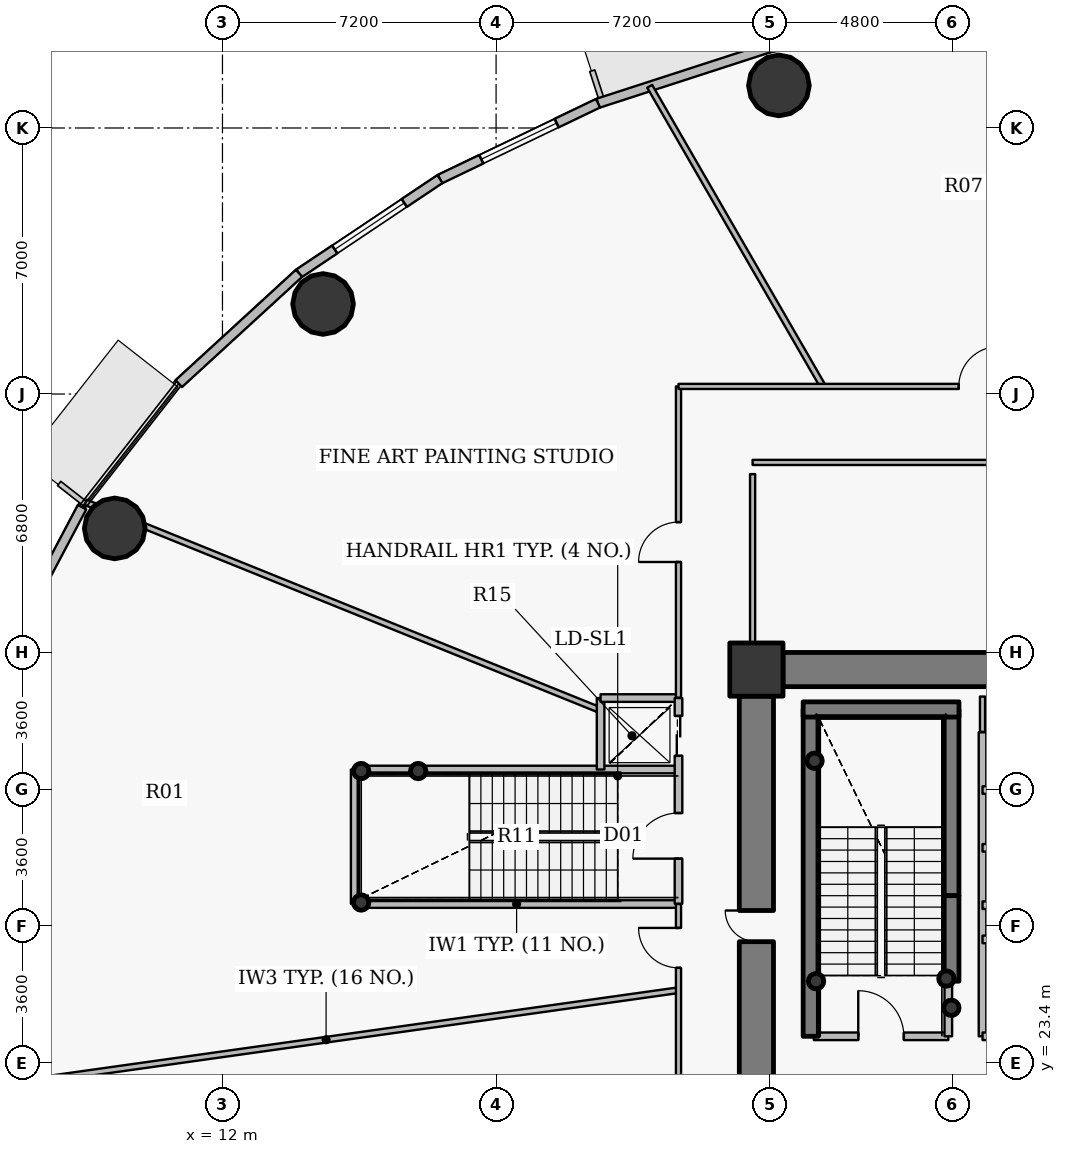
"""IFC4 building model, lengths in metres.
Left out: names, types, materials, properties, quantities, classifications, styles, units other than length and angle.
Written with IfcOpenShell. Run it as: python <this file> out.ifc"""

import sys

from ifc_helpers import new_model, si_unit, direction, frame, frame_2d, origin, origin_2d, place, context, subcontext, project, spatial, rectangle, hollow_circle, extrude, source, transform, mapped, element, fill, save


model = new_model("IFC4")
c1 = context("Model", 3, precision=1e-05, world=origin(), true_north=direction((0.0, 1.0)))
c2 = subcontext(c1, "Body", "Model", "MODEL_VIEW")
j1 = project(units=[si_unit("LENGTHUNIT", "METRE"), si_unit("PLANEANGLEUNIT", "RADIAN")], contexts=[c1])
p1 = place(None, origin())
s1 = spatial("IfcSite", under=j1, at=p1, CompositionType="ELEMENT")
p2 = place(p1, origin())
s2 = spatial("IfcBuilding", under=s1, at=p2, CompositionType="ELEMENT")
p3 = place(p2, frame((0.0, 0.0, 40.8)))
s3 = spatial("IfcBuildingStorey", under=s2, at=p3, CompositionType="ELEMENT", Elevation=40.8)
p4 = place(p3, frame((26.05, 33.75, 0.0), z_axis=(0.0, 0.0, 1.0), x_axis=(1.0, 0.0, 0.0)))
e1 = element("IfcColumn", 1, at=p4, inside=s3, PredefinedType="COLUMN", context=c2, shape_type="SweptSolid", body=[
    extrude(rectangle(XDim=1.4, YDim=1.4, at=origin_2d()), origin(), (0.0, 0.0, 1.0), 4.2),
])
p5 = place(p3, frame((27.48, 24.1, 0.0), z_axis=(0.0, 0.0, 1.0), x_axis=(0.0, 1.0, 0.0)))
e2 = element("IfcWall", 2, at=p5, inside=s3, PredefinedType="SHEAR", context=c2, shape_type="SweptSolid", body=[
    extrude(rectangle(XDim=8.6, YDim=0.4, at=frame_2d((4.3, 0.0))), origin(), (0.0, 0.0, 1.0), 4.2),
])
p6 = place(p3, frame((31.18, 27.8, 0.0), z_axis=(0.0, 0.0, 1.0), x_axis=(0.0, 1.0, 0.0)))
e3 = element("IfcWall", 3, at=p6, inside=s3, PredefinedType="SHEAR", context=c2, shape_type="SweptSolid", body=[
    extrude(rectangle(XDim=4.9, YDim=0.4, at=frame_2d((2.45, 0.0))), origin(), (0.0, 0.0, 1.0), 4.2),
])
p7 = place(p3, frame((27.28, 32.7, 0.0), z_axis=(0.0, 0.0, 1.0), x_axis=(1.0, 0.0, 0.0)))
e4 = element("IfcWall", 4, at=p7, inside=s3, PredefinedType="SHEAR", context=c2, shape_type="SweptSolid", body=[
    extrude(rectangle(XDim=4.1, YDim=0.4, at=frame_2d((2.05, 0.0))), origin(), (0.0, 0.0, 1.0), 4.2),
])
for number, where, z_axis, x_axis in (
    (5, (27.58, 31.35, 0.0), (0.0, 0.0, 1.0), (1.0, 0.0, 0.0)),
    (6, (31.05, 25.62, 0.0), (0.0, 0.0, 1.0), (1.0, 0.0, 0.0)),
    (7, (31.18, 24.85, 0.0), (0.0, 0.0, 1.0), (1.0, 0.0, 0.0)),
    (8, (27.62, 25.55, 0.0), (0.0, 0.0, 1.0), (1.0, 0.0, 0.0)),
    (9, (15.65, 27.62, 0.0), (0.0, 0.0, 1.0), (1.0, 0.0, 0.0)),
    (10, (15.65, 31.08, 0.0), (0.0, 0.0, 1.0), (1.0, 0.0, 0.0)),
    (11, (17.15, 31.08, 0.0), (0.0, 0.0, 1.0), (1.0, 0.0, 0.0)),
):
    element("IfcColumn", number, at=place(p3, frame(where, z_axis=z_axis, x_axis=x_axis)), inside=s3, PredefinedType="COLUMN", context=c2, shape_type="SweptSolid", body=[
        extrude(hollow_circle(Radius=0.203, WallThickness=0.016, at=origin_2d()), origin(), (0.0, 0.0, 1.0), 4.2),
    ])
p8 = place(p3, frame((26.75, 33.75, 0.0), z_axis=(0.0, 0.0, 1.0), x_axis=(1.0, 0.0, 0.0)))
e12 = element("IfcWall", 12, at=p8, inside=s3, PredefinedType="SHEAR", context=c2, shape_type="SweptSolid", body=[
    extrude(rectangle(XDim=18.5, YDim=0.9, at=frame_2d((9.25, 0.0))), origin(), (0.0, 0.0, 1.0), 3.4),
])
p9 = place(p3, frame((26.05, 20.95, 0.0), z_axis=(0.0, 0.0, 1.0), x_axis=(0.0, 1.0, 0.0)))
e13 = element("IfcWall", 13, at=p9, inside=s3, PredefinedType="SHEAR", context=c2, shape_type="SweptSolid", body=[
    extrude(rectangle(XDim=12.1, YDim=0.9, at=frame_2d((6.05, 0.0))), origin(), (0.0, 0.0, 1.0), 3.4),
])
p10 = place(p9, frame((5.64, 0.0, 0.0)))
e14 = element("IfcOpeningElement", 14, at=p10, cuts=e13, PredefinedType="OPENING", context=c2, shape_type="SweptSolid", body=[
    extrude(rectangle(XDim=0.82, YDim=2.1, at=origin_2d()), frame((0.41, 0.46, 1.05), z_axis=(0.0, -1.0, 0.0), x_axis=(1.0, 0.0, 0.0)), (0.0, 0.0, 1.0), 0.92),
])
p11 = place(p3, frame((31.18, 25.55, 0.0), z_axis=(0.0, 0.0, 1.0), x_axis=(0.0, 1.0, 0.0)))
e15 = element("IfcWall", 15, at=p11, inside=s3, PredefinedType="SHEAR", context=c2, shape_type="SweptSolid", body=[
    extrude(rectangle(XDim=2.25, YDim=0.4, at=frame_2d((1.125, 0.0))), origin(), (0.0, 0.0, 1.0), 3.55),
])
for number, where, z_axis, x_axis in (
    (16, (26.642, 49.12, 0.0), (0.0, 0.0, 1.0), (1.0, 0.0, 0.0)),
    (17, (14.647, 43.369, 0.0), (0.0, 0.0, 1.0), (1.0, 0.0, 0.0)),
    (18, (9.165, 37.464, 0.0), (0.0, 0.0, 1.0), (1.0, 0.0, 0.0)),
):
    element("IfcColumn", number, at=place(p3, frame(where, z_axis=z_axis, x_axis=x_axis)), inside=s3, PredefinedType="COLUMN", context=c2, shape_type="SweptSolid", body=[
        extrude(hollow_circle(Radius=0.8, WallThickness=0.045, at=origin_2d()), origin(), (0.0, 0.0, 1.0), 4.2),
    ])
p12 = place(p3, frame((21.882, 48.651, 0.0), z_axis=(0.0, 0.0, 1.0), x_axis=(0.951207699013, 0.308551313946, 0.0)))
e19 = element("IfcWall", 19, at=p12, inside=s3, PredefinedType="SOLIDWALL", context=c2, shape_type="SweptSolid", body=[
    extrude(rectangle(XDim=4.739, YDim=0.25, at=frame_2d((2.369, 0.0))), origin(), (0.0, 0.0, 1.0), 3.95),
])
p13 = place(p3, frame((17.723, 46.656, 0.0), z_axis=(0.0, 0.0, 1.0), x_axis=(0.901601503137, 0.432567601123, 0.0)))
e20 = element("IfcWall", 20, at=p13, inside=s3, PredefinedType="SOLIDWALL", context=c2, shape_type="SweptSolid", body=[
    extrude(rectangle(XDim=4.613, YDim=0.25, at=frame_2d((2.306, 0.0))), origin(), (0.0, 0.0, 1.0), 3.95),
])
p14 = place(p13, frame((1.207, 0.0, 0.9)))
e21 = element("IfcOpeningElement", 21, at=p14, cuts=e20, PredefinedType="OPENING", context=c2, shape_type="SweptSolid", body=[
    extrude(rectangle(XDim=2.2, YDim=2.0, at=origin_2d()), frame((1.1, 0.135, 1.0), z_axis=(0.0, -1.0, 0.0), x_axis=(1.0, 0.0, 0.0)), (0.0, 0.0, 1.0), 0.27),
])
p15 = place(p3, frame((14.015, 44.176, 0.0), z_axis=(0.0, 0.0, 1.0), x_axis=(0.831240982525, 0.555912249343, 0.0)))
e22 = element("IfcWall", 22, at=p15, inside=s3, PredefinedType="SOLIDWALL", context=c2, shape_type="SweptSolid", body=[
    extrude(rectangle(XDim=4.46, YDim=0.25, at=frame_2d((2.23, 0.0))), origin(), (0.0, 0.0, 1.0), 3.95),
])
p16 = place(p15, frame((1.13, 0.0, 0.9)))
e23 = element("IfcOpeningElement", 23, at=p16, cuts=e22, PredefinedType="OPENING", context=c2, shape_type="SweptSolid", body=[
    extrude(rectangle(XDim=2.2, YDim=2.0, at=origin_2d()), frame((1.1, 0.135, 1.0), z_axis=(0.0, -1.0, 0.0), x_axis=(1.0, 0.0, 0.0)), (0.0, 0.0, 1.0), 0.27),
])
p17 = place(p3, frame((10.85, 41.275, 0.0), z_axis=(0.0, 0.0, 1.0), x_axis=(0.737116376281, 0.67576582321, 0.0)))
e24 = element("IfcWall", 24, at=p17, inside=s3, PredefinedType="SOLIDWALL", context=c2, shape_type="SweptSolid", body=[
    extrude(rectangle(XDim=4.294, YDim=0.25, at=frame_2d((2.147, 0.0))), origin(), (0.0, 0.0, 1.0), 3.95),
])
p18 = place(p3, frame((6.442, 34.501, 0.0), z_axis=(0.0, 0.0, 1.0), x_axis=(0.467662443071, 0.883907144072, 0.0)))
e25 = element("IfcWall", 25, at=p18, inside=s3, PredefinedType="SOLIDWALL", context=c2, shape_type="SweptSolid", body=[
    extrude(rectangle(XDim=3.984, YDim=0.25, at=frame_2d((1.992, 0.0))), origin(), (0.0, 0.0, 1.0), 3.95),
])
p19 = place(p3, frame((5.454, 22.707, 0.0), z_axis=(0.0, 0.0, 1.0), x_axis=(0.990268652703, 0.139168945795, 0.0)))
e26 = element("IfcWall", 26, at=p19, inside=s3, PredefinedType="PARTITIONING", context=c2, shape_type="SweptSolid", body=[
    extrude(rectangle(XDim=18.729, YDim=0.15, at=frame_2d((9.364, 0.0))), origin(), (0.0, 0.0, 1.0), 3.335),
])
p20 = place(p3, frame((8.4, 38.151, 0.0), z_axis=(0.0, 0.0, 1.0), x_axis=(0.927179581649, -0.374617169084, 0.0)))
e27 = element("IfcWall", 27, at=p20, inside=s3, PredefinedType="PARTITIONING", context=c2, shape_type="SweptSolid", body=[
    extrude(rectangle(XDim=14.615, YDim=0.15, at=frame_2d((7.307, 0.0))), origin(), (0.0, 0.0, 1.0), 3.285),
])
p21 = place(p3, frame((15.48, 27.58, 0.0), z_axis=(0.0, 0.0, 1.0), x_axis=(0.0, 1.0, 0.0)))
e28 = element("IfcWall", 28, at=p21, inside=s3, PredefinedType="PARTITIONING", context=c2, shape_type="SweptSolid", body=[
    extrude(rectangle(XDim=3.54, YDim=0.2, at=frame_2d((1.77, 0.0))), origin(), (0.0, 0.0, 1.0), 3.95),
])
for number, where, z_axis, x_axis in (
    (29, (15.48, 27.58, 0.0), (0.0, 0.0, 1.0), (1.0, 0.0, 0.0)),
    (30, (15.48, 31.12, 0.0), (0.0, 0.0, 1.0), (1.0, 0.0, 0.0)),
):
    element("IfcWall", number, at=place(p3, frame(where, z_axis=z_axis, x_axis=x_axis)), inside=s3, PredefinedType="PARTITIONING", context=c2, shape_type="SweptSolid", body=[
        extrude(rectangle(XDim=8.52, YDim=0.2, at=frame_2d((4.26, 0.0))), origin(), (0.0, 0.0, 1.0), 3.95),
    ])
p22 = place(p3, frame((21.95, 31.12, 0.0), z_axis=(0.0, 0.0, 1.0), x_axis=(0.0, 1.0, 0.0)))
e31 = element("IfcWall", 31, at=p22, inside=s3, PredefinedType="PARTITIONING", context=c2, shape_type="SweptSolid", body=[
    extrude(rectangle(XDim=1.88, YDim=0.2, at=frame_2d((0.94, 0.0))), origin(), (0.0, 0.0, 1.0), 3.285),
])
p23 = place(p3, frame((21.95, 33.0, 0.0), z_axis=(0.0, 0.0, 1.0), x_axis=(1.0, 0.0, 0.0)))
e32 = element("IfcWall", 32, at=p23, inside=s3, PredefinedType="PARTITIONING", context=c2, shape_type="SweptSolid", body=[
    extrude(rectangle(XDim=2.05, YDim=0.2, at=frame_2d((1.025, 0.0))), origin(), (0.0, 0.0, 1.0), 3.95),
])
p24 = place(p3, frame((23.242, 49.098, 0.0), z_axis=(0.0, 0.0, 1.0), x_axis=(0.499985867395, -0.866033563094, 0.0)))
e33 = element("IfcWall", 33, at=p24, inside=s3, PredefinedType="PARTITIONING", context=c2, shape_type="SweptSolid", body=[
    extrude(rectangle(XDim=9.119, YDim=0.15, at=frame_2d((4.56, 0.0))), origin(), (0.0, 0.0, 1.0), 3.335),
])
p25 = place(p3, frame((24.0, 14.8, 0.0), z_axis=(0.0, 0.0, 1.0), x_axis=(0.0, 1.0, 0.0)))
e34 = element("IfcWall", 34, at=p25, inside=s3, PredefinedType="PARTITIONING", context=c2, shape_type="SweptSolid", body=[
    extrude(rectangle(XDim=12.78, YDim=0.135, at=frame_2d((6.39, 0.0))), origin(), (0.0, 0.0, 1.0), 3.285),
])
p26 = place(p25, frame((11.102, 0.0, 0.0)))
e35 = element("IfcOpeningElement", 35, at=p26, cuts=e34, PredefinedType="OPENING", context=c2, shape_type="SweptSolid", body=[
    extrude(rectangle(XDim=1.05, YDim=2.15, at=origin_2d()), frame((0.525, 0.078, 1.075), z_axis=(0.0, -1.0, 0.0), x_axis=(1.0, 0.0, 0.0)), (0.0, 0.0, 1.0), 0.155),
])
p27 = place(p25, frame((6.144, 0.0, 0.0)))
e36 = element("IfcOpeningElement", 36, at=p27, cuts=e34, PredefinedType="OPENING", context=c2, shape_type="SweptSolid", body=[
    extrude(rectangle(XDim=1.05, YDim=2.15, at=origin_2d()), frame((0.525, 0.078, 1.075), z_axis=(0.0, -1.0, 0.0), x_axis=(1.0, 0.0, 0.0)), (0.0, 0.0, 1.0), 0.155),
])
p28 = place(p3, frame((24.0, 27.59, 0.0), z_axis=(0.0, 0.0, 1.0), x_axis=(0.0, 1.0, 0.0)))
e37 = element("IfcWall", 37, at=p28, inside=s3, PredefinedType="PARTITIONING", context=c2, shape_type="SweptSolid", body=[
    extrude(rectangle(XDim=5.41, YDim=0.2, at=frame_2d((2.705, 0.0))), origin(), (0.0, 0.0, 1.0), 3.285),
])
p29 = place(p28, frame((1.185, 0.0, 0.0)))
e38 = element("IfcOpeningElement", 38, at=p29, cuts=e37, PredefinedType="OPENING", context=c2, shape_type="SweptSolid", body=[
    extrude(rectangle(XDim=1.2, YDim=2.15, at=origin_2d()), frame((0.6, 0.11, 1.075), z_axis=(0.0, -1.0, 0.0), x_axis=(1.0, 0.0, 0.0)), (0.0, 0.0, 1.0), 0.22),
])
p30 = place(p28, frame((3.89, 0.0, 0.0)))
e39 = element("IfcOpeningElement", 39, at=p30, cuts=e37, PredefinedType="OPENING", context=c2, shape_type="SweptSolid", body=[
    extrude(rectangle(XDim=1.05, YDim=2.15, at=origin_2d()), frame((0.525, 0.11, 1.075), z_axis=(0.0, -1.0, 0.0), x_axis=(1.0, 0.0, 0.0)), (0.0, 0.0, 1.0), 0.22),
])
p31 = place(p3, frame((24.0, 33.01, 0.0), z_axis=(0.0, 0.0, 1.0), x_axis=(0.0, 1.0, 0.0)))
e40 = element("IfcWall", 40, at=p31, inside=s3, PredefinedType="PARTITIONING", context=c2, shape_type="SweptSolid", body=[
    extrude(rectangle(XDim=8.19, YDim=0.135, at=frame_2d((4.095, 0.0))), origin(), (0.0, 0.0, 1.0), 3.285),
])
p32 = place(p31, frame((3.57, 0.0, 0.0)))
e41 = element("IfcOpeningElement", 41, at=p32, cuts=e40, PredefinedType="OPENING", context=c2, shape_type="SweptSolid", body=[
    extrude(rectangle(XDim=1.05, YDim=2.15, at=origin_2d()), frame((0.525, 0.078, 1.075), z_axis=(0.0, -1.0, 0.0), x_axis=(1.0, 0.0, 0.0)), (0.0, 0.0, 1.0), 0.155),
])
p33 = place(p3, frame((24.0, 41.2, 0.0), z_axis=(0.0, 0.0, 1.0), x_axis=(1.0, 0.0, 0.0)))
e42 = element("IfcWall", 42, at=p33, inside=s3, PredefinedType="PARTITIONING", context=c2, shape_type="SweptSolid", body=[
    extrude(rectangle(XDim=24.0, YDim=0.135, at=frame_2d((12.0, 0.0))), origin(), (0.0, 0.0, 1.0), 3.285),
])
p34 = place(p33, frame((15.574, 0.0, 0.0)))
e43 = element("IfcOpeningElement", 43, at=p34, cuts=e42, PredefinedType="OPENING", context=c2, shape_type="SweptSolid", body=[
    extrude(rectangle(XDim=1.05, YDim=2.15, at=origin_2d()), frame((0.525, 0.078, 1.075), z_axis=(0.0, -1.0, 0.0), x_axis=(1.0, 0.0, 0.0)), (0.0, 0.0, 1.0), 0.155),
])
p35 = place(p33, frame((7.376, 0.0, 0.0)))
e44 = element("IfcOpeningElement", 44, at=p35, cuts=e42, PredefinedType="OPENING", context=c2, shape_type="SweptSolid", body=[
    extrude(rectangle(XDim=1.05, YDim=2.15, at=origin_2d()), frame((0.525, 0.078, 1.075), z_axis=(0.0, -1.0, 0.0), x_axis=(1.0, 0.0, 0.0)), (0.0, 0.0, 1.0), 0.155),
])
p36 = place(p3, frame((27.56, 24.1, 0.0), z_axis=(0.0, 0.0, 1.0), x_axis=(1.0, 0.0, 0.0)))
e45 = element("IfcWall", 45, at=p36, inside=s3, PredefinedType="PARTITIONING", context=c2, shape_type="SweptSolid", body=[
    extrude(rectangle(XDim=3.54, YDim=0.2, at=frame_2d((1.77, 0.0))), origin(), (0.0, 0.0, 1.0), 3.95),
])
p37 = place(p36, frame((1.17, 0.0, 0.0)))
e46 = element("IfcOpeningElement", 46, at=p37, cuts=e45, PredefinedType="OPENING", context=c2, shape_type="SweptSolid", body=[
    extrude(rectangle(XDim=1.2, YDim=2.15, at=origin_2d()), frame((0.6, 0.11, 1.075), z_axis=(0.0, -1.0, 0.0), x_axis=(1.0, 0.0, 0.0)), (0.0, 0.0, 1.0), 0.22),
])
p38 = place(p3, frame((31.1, 24.1, 0.0), z_axis=(0.0, 0.0, 1.0), x_axis=(0.0, 1.0, 0.0)))
e47 = element("IfcWall", 47, at=p38, inside=s3, PredefinedType="PARTITIONING", context=c2, shape_type="SweptSolid", body=[
    extrude(rectangle(XDim=1.44, YDim=0.2, at=frame_2d((0.72, 0.0))), origin(), (0.0, 0.0, 1.0), 3.95),
])
p39 = place(p3, frame((32.0, 24.1, 0.0), z_axis=(0.0, 0.0, 1.0), x_axis=(0.0, 1.0, 0.0)))
e48 = element("IfcWall", 48, at=p39, inside=s3, PredefinedType="PARTITIONING", context=c2, shape_type="SweptSolid", body=[
    extrude(rectangle(XDim=8.0, YDim=0.2, at=frame_2d((4.0, 0.0))), origin(), (0.0, 0.0, 1.0), 3.95),
])
p40 = place(p3, frame((32.0, 24.1, 0.0), z_axis=(0.0, 0.0, 1.0), x_axis=(1.0, 0.0, 0.0)))
e49 = element("IfcWall", 49, at=p40, inside=s3, PredefinedType="PARTITIONING", context=c2, shape_type="SweptSolid", body=[
    extrude(rectangle(XDim=1.9, YDim=0.2, at=frame_2d((0.95, 0.0))), origin(), (0.0, 0.0, 1.0), 3.535),
])
p41 = place(p40, frame((0.375, 0.0, 0.0)))
e50 = element("IfcOpeningElement", 50, at=p41, cuts=e49, PredefinedType="OPENING", context=c2, shape_type="SweptSolid", body=[
    extrude(rectangle(XDim=1.15, YDim=2.15, at=origin_2d()), frame((0.575, 0.11, 1.075), z_axis=(0.0, -1.0, 0.0), x_axis=(1.0, 0.0, 0.0)), (0.0, 0.0, 1.0), 0.22),
])
for number, where, z_axis, x_axis in (
    (51, (32.0, 26.65, 0.0), (0.0, 0.0, 1.0), (1.0, 0.0, 0.0)),
    (52, (32.0, 27.55, 0.0), (0.0, 0.0, 1.0), (1.0, 0.0, 0.0)),
    (53, (32.0, 29.06, 0.0), (0.0, 0.0, 1.0), (1.0, 0.0, 0.0)),
    (54, (32.0, 30.58, 0.0), (0.0, 0.0, 1.0), (1.0, 0.0, 0.0)),
):
    element("IfcWall", number, at=place(p3, frame(where, z_axis=z_axis, x_axis=x_axis)), inside=s3, PredefinedType="PARTITIONING", context=c2, shape_type="SweptSolid", body=[
        extrude(rectangle(XDim=1.9, YDim=0.2, at=frame_2d((0.95, 0.0))), origin(), (0.0, 0.0, 1.0), 3.535),
    ])
p42 = place(p3, frame((32.0, 33.04, 0.0), z_axis=(0.0, 0.0, 1.0), x_axis=(0.0, -1.0, 0.0)))
e55 = element("IfcWall", 55, at=p42, inside=s3, PredefinedType="PARTITIONING", context=c2, shape_type="SweptSolid", body=[
    extrude(rectangle(XDim=0.93, YDim=0.135, at=frame_2d((0.465, 0.0))), origin(), (0.0, 0.0, 1.0), 3.485),
])
p43 = place(p3, frame((38.893, 39.2, 0.0), z_axis=(0.0, 0.0, 1.0), x_axis=(-1.0, 0.0, 0.0)))
e56 = element("IfcWall", 56, at=p43, inside=s3, PredefinedType="PARTITIONING", context=c2, shape_type="SweptSolid", body=[
    extrude(rectangle(XDim=12.943, YDim=0.135, at=frame_2d((6.471, 0.0))), origin(), (0.0, 0.0, 1.0), 3.285),
])
p44 = place(p3, frame((25.95, 38.893, 0.0), z_axis=(0.0, 0.0, 1.0), x_axis=(0.0, -1.0, 0.0)))
e57 = element("IfcWall", 57, at=p44, inside=s3, PredefinedType="PARTITIONING", context=c2, shape_type="SweptSolid", body=[
    extrude(rectangle(XDim=4.693, YDim=0.135, at=frame_2d((2.346, 0.0))), origin(), (0.0, 0.0, 1.0), 3.285),
])
p45 = place(p3, frame((25.6, 34.2, 0.0), z_axis=(0.0, 0.0, 1.0), x_axis=(0.0, -1.0, 0.0)))
e58 = element("IfcWall", 58, at=p45, inside=s3, PredefinedType="PARTITIONING", context=c2, shape_type="SweptSolid", body=[
    extrude(rectangle(XDim=1.14, YDim=0.135, at=frame_2d((0.57, 0.0))), origin(), (0.0, 0.0, 1.0), 3.95),
])
m1 = source(origin(), c2, "Body", "SweptSolid", [
    extrude(rectangle(XDim=2.2, YDim=2.0, at=origin_2d()), frame((1.1, 0.03, 1.0), z_axis=(0.0, -1.0, 0.0), x_axis=(1.0, 0.0, 0.0)), (0.0, 0.0, 1.0), 0.06),
])
p46 = place(p14, origin())
e59 = element("IfcWindow", 59, at=p46, inside=s3, PartitioningType="TRIPLE_PANEL_VERTICAL", PredefinedType="WINDOW", context=c2, shape_type="MappedRepresentation", body=[
    mapped(m1, transform((0.0, 0.0, 0.0), x_axis=(1.0, 0.0, 0.0), y_axis=(0.0, 1.0, 0.0), z_axis=(0.0, 0.0, 1.0), scale=1.0)),
])
fill(e21, e59)
p47 = place(p16, origin())
e60 = element("IfcWindow", 60, at=p47, inside=s3, PartitioningType="TRIPLE_PANEL_VERTICAL", PredefinedType="WINDOW", context=c2, shape_type="MappedRepresentation", body=[
    mapped(m1, transform((0.0, 0.0, 0.0), x_axis=(1.0, 0.0, 0.0), y_axis=(0.0, 1.0, 0.0), z_axis=(0.0, 0.0, 1.0), scale=1.0)),
])
fill(e23, e60)
m2 = source(origin(), c2, "Body", "SweptSolid", [
    extrude(rectangle(XDim=0.82, YDim=2.1, at=origin_2d()), frame((0.41, 0.025, 1.05), z_axis=(0.0, -1.0, 0.0), x_axis=(1.0, 0.0, 0.0)), (0.0, 0.0, 1.0), 0.05),
])
p48 = place(p10, origin())
e61 = element("IfcDoor", 61, at=p48, inside=s3, OperationType="SINGLE_SWING_RIGHT", PredefinedType="DOOR", context=c2, shape_type="MappedRepresentation", body=[
    mapped(m2, transform((0.0, 0.0, 0.0), x_axis=(1.0, 0.0, 0.0), y_axis=(0.0, 1.0, 0.0), z_axis=(0.0, 0.0, 1.0), scale=1.0)),
])
fill(e14, e61)
m3 = source(origin(), c2, "Body", "SweptSolid", [
    extrude(rectangle(XDim=1.2, YDim=2.15, at=origin_2d()), frame((0.6, 0.025, 1.075), z_axis=(0.0, -1.0, 0.0), x_axis=(1.0, 0.0, 0.0)), (0.0, 0.0, 1.0), 0.05),
])
p49 = place(p37, origin())
e62 = element("IfcDoor", 62, at=p49, inside=s3, OperationType="SINGLE_SWING_LEFT", PredefinedType="DOOR", context=c2, shape_type="MappedRepresentation", body=[
    mapped(m3, transform((0.0, 0.0, 0.0), x_axis=(1.0, 0.0, 0.0), y_axis=(0.0, 1.0, 0.0), z_axis=(0.0, 0.0, 1.0), scale=1.0)),
])
fill(e46, e62)
p50 = place(p29, origin())
e63 = element("IfcDoor", 63, at=p50, inside=s3, OperationType="SINGLE_SWING_LEFT", PredefinedType="DOOR", context=c2, shape_type="MappedRepresentation", body=[
    mapped(m3, transform((0.0, 0.0, 0.0), x_axis=(1.0, 0.0, 0.0), y_axis=(0.0, 1.0, 0.0), z_axis=(0.0, 0.0, 1.0), scale=1.0)),
])
fill(e38, e63)
m4 = source(origin(), c2, "Body", "SweptSolid", [
    extrude(rectangle(XDim=1.05, YDim=2.15, at=origin_2d()), frame((0.525, 0.025, 1.075), z_axis=(0.0, -1.0, 0.0), x_axis=(1.0, 0.0, 0.0)), (0.0, 0.0, 1.0), 0.05),
])
p51 = place(p30, origin())
e64 = element("IfcDoor", 64, at=p51, inside=s3, OperationType="DOUBLE_DOOR_SLIDING", PredefinedType="USERDEFINED", context=c2, shape_type="MappedRepresentation", body=[
    mapped(m4, transform((0.0, 0.0, 0.0), x_axis=(1.0, 0.0, 0.0), y_axis=(0.0, 1.0, 0.0), z_axis=(0.0, 0.0, 1.0), scale=1.0)),
])
fill(e39, e64)
m5 = source(origin(), c2, "Body", "SweptSolid", [
    extrude(rectangle(XDim=1.05, YDim=2.15, at=origin_2d()), frame((0.525, 0.025, 1.075), z_axis=(0.0, -1.0, 0.0), x_axis=(1.0, 0.0, 0.0)), (0.0, 0.0, 1.0), 0.05),
])
p52 = place(p35, origin())
e65 = element("IfcDoor", 65, at=p52, inside=s3, OperationType="SINGLE_SWING_RIGHT", PredefinedType="DOOR", context=c2, shape_type="MappedRepresentation", body=[
    mapped(m5, transform((0.0, 0.0, 0.0), x_axis=(1.0, 0.0, 0.0), y_axis=(0.0, 1.0, 0.0), z_axis=(0.0, 0.0, 1.0), scale=1.0)),
])
fill(e44, e65)
p53 = place(p32, origin())
e66 = element("IfcDoor", 66, at=p53, inside=s3, OperationType="SINGLE_SWING_LEFT", PredefinedType="DOOR", context=c2, shape_type="MappedRepresentation", body=[
    mapped(m5, transform((0.0, 0.0, 0.0), x_axis=(1.0, 0.0, 0.0), y_axis=(0.0, 1.0, 0.0), z_axis=(0.0, 0.0, 1.0), scale=1.0)),
])
fill(e41, e66)
p54 = place(p26, origin())
e67 = element("IfcDoor", 67, at=p54, inside=s3, OperationType="SINGLE_SWING_RIGHT", PredefinedType="DOOR", context=c2, shape_type="MappedRepresentation", body=[
    mapped(m5, transform((0.0, 0.0, 0.0), x_axis=(1.0, 0.0, 0.0), y_axis=(0.0, 1.0, 0.0), z_axis=(0.0, 0.0, 1.0), scale=1.0)),
])
fill(e35, e67)
save(model, sys.argv[1])
